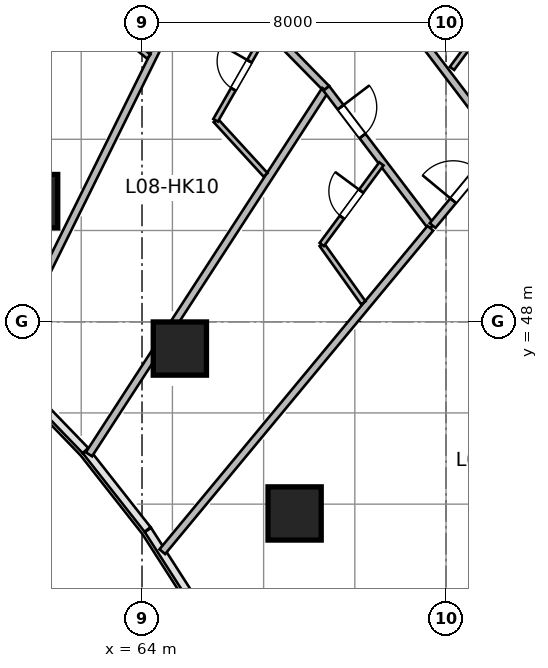
"""IFC4 building model, lengths in metres.
Left out: names, types, materials, properties, quantities, classifications, styles, units other than length and angle.
Written with IfcOpenShell. Run it as: python <this file> out.ifc"""

import sys

from ifc_helpers import new_model, si_unit, direction, frame, frame_2d, origin, origin_2d, place, context, subcontext, project, spatial, rectangle, circle, extrude, source, transform, mapped, element, fill, save


model = new_model("IFC4")
c1 = context("Model", 3, precision=1e-05, world=origin(), true_north=direction((0.0, 1.0)))
c2 = subcontext(c1, "Body", "Model", "MODEL_VIEW")
j1 = project(units=[si_unit("LENGTHUNIT", "METRE"), si_unit("PLANEANGLEUNIT", "RADIAN")], contexts=[c1])
p1 = place(None, origin())
s1 = spatial("IfcSite", under=j1, at=p1, CompositionType="ELEMENT")
p2 = place(p1, origin())
s2 = spatial("IfcBuilding", under=s1, at=p2, CompositionType="ELEMENT")
p3 = place(p2, frame((0.0, 0.0, 42.6)))
s3 = spatial("IfcBuildingStorey", under=s2, at=p3, CompositionType="ELEMENT", Elevation=42.6)
m1 = source(origin(), c2, "Body", "SweptSolid", [
    extrude(circle(Radius=0.7, at=origin_2d()), origin(), (0.0, 0.0, 1.0), 3.6),
])
for number, where, z_axis, x_axis in (
    (1, (61.082, 51.175, 0.0), (0.0, 0.0, 1.0), (0.409, 0.912, 0.0)),
    (2, (64.996, 47.294, 0.0), (0.0, 0.0, 1.0), (0.558, 0.83, 0.0)),
    (3, (68.015, 42.955, 0.0), (0.0, 0.0, 1.0), (0.691, 0.723, 0.0)),
):
    element("IfcColumn", number, at=place(p3, frame(where, z_axis=z_axis, x_axis=x_axis)), inside=s3, PredefinedType="COLUMN", context=c2, shape_type="MappedRepresentation", body=[
        mapped(m1, transform((0.0, 0.0, 0.0), scale=1.0)),
    ])
m2 = source(origin(), c2, "Body", "SweptSolid", [
    extrude(rectangle(XDim=12.196, YDim=0.195, at=frame_2d((6.098, 0.0))), origin(), (0.0, 0.0, 1.0), 3.36),
])
p4 = place(p3, frame((57.742, 48.766, 0.0), z_axis=(0.0, 0.0, 1.0), x_axis=(0.342022711534, 0.939691686031, 0.0)))
e4 = element("IfcWall", 4, at=p4, inside=s3, PredefinedType="PARTITIONING", context=c2, shape_type="MappedRepresentation", body=[
    mapped(m2, transform((0.0, 0.0, 0.0), scale=1.0)),
])
m3 = source(origin(), c2, "Body", "SweptSolid", [
    extrude(rectangle(XDim=11.844, YDim=0.195, at=frame_2d((5.922, 0.0))), origin(), (0.0, 0.0, 1.0), 3.36),
])
p5 = place(p3, frame((60.273, 46.848, 0.0), z_axis=(0.0, 0.0, 1.0), x_axis=(0.442871152218, 0.896585267854, 0.0)))
e5 = element("IfcWall", 5, at=p5, inside=s3, PredefinedType="PARTITIONING", context=c2, shape_type="MappedRepresentation", body=[
    mapped(m3, transform((0.0, 0.0, 0.0), scale=1.0)),
])
m4 = source(origin(), c2, "Body", "SweptSolid", [
    extrude(rectangle(XDim=1.873, YDim=0.14, at=frame_2d((0.937, 0.0))), origin(), (0.0, 0.0, 1.0), 3.36),
])
p6 = place(p3, frame((62.734, 56.169, 0.0), z_axis=(0.0, 0.0, 1.0), x_axis=(0.77069451688, -0.637204803537, 0.0)))
e6 = element("IfcWall", 6, at=p6, inside=s3, PredefinedType="PARTITIONING", context=c2, shape_type="MappedRepresentation", body=[
    mapped(m4, transform((0.0, 0.0, 0.0), scale=1.0)),
])
m5 = source(origin(), c2, "Body", "SweptSolid", [
    extrude(rectangle(XDim=4.724, YDim=0.195, at=frame_2d((2.362, 0.0))), origin(), (0.0, 0.0, 1.0), 3.36),
])
p7 = place(p3, frame((65.541, 57.511, 0.0), z_axis=(0.0, 0.0, 1.0), x_axis=(0.700435057457, -0.713716141253, 0.0)))
e7 = element("IfcWall", 7, at=p7, inside=s3, PredefinedType="PARTITIONING", context=c2, shape_type="MappedRepresentation", body=[
    mapped(m5, transform((0.0, 0.0, 0.0), scale=1.0)),
])
p8 = place(p7, frame((0.659, 0.0, 0.0)))
e8 = element("IfcOpeningElement", 8, at=p8, cuts=e7, PredefinedType="OPENING", context=c2, shape_type="SweptSolid", body=[
    extrude(rectangle(XDim=0.95, YDim=2.15, at=frame_2d((0.475, 1.075))), frame((0.0, 0.107, 0.0), z_axis=(0.0, -1.0, 0.0), x_axis=(1.0, 0.0, 0.0)), (0.0, 0.0, 1.0), 0.215),
])
m6 = source(origin(), c2, "Body", "SweptSolid", [
    extrude(rectangle(XDim=11.429, YDim=0.195, at=frame_2d((5.714, 0.0))), origin(), (0.0, 0.0, 1.0), 3.36),
])
p9 = place(p3, frame((62.604, 44.511, 0.0), z_axis=(0.0, 0.0, 1.0), x_axis=(0.544215487077, 0.838945471187, 0.0)))
e9 = element("IfcWall", 9, at=p9, inside=s3, PredefinedType="PARTITIONING", context=c2, shape_type="MappedRepresentation", body=[
    mapped(m6, transform((0.0, 0.0, 0.0), scale=1.0)),
])
m7 = source(origin(), c2, "Body", "SweptSolid", [
    extrude(rectangle(XDim=1.947, YDim=0.14, at=frame_2d((0.973, 0.0))), origin(), (0.0, 0.0, 1.0), 2.803),
])
p10 = place(p3, frame((65.936, 53.3, 0.0), z_axis=(0.0, 0.0, 1.0), x_axis=(0.675383794012, -0.737466426888, 0.0)))
e10 = element("IfcWall", 10, at=p10, inside=s3, PredefinedType="PARTITIONING", context=c2, shape_type="MappedRepresentation", body=[
    mapped(m7, transform((0.0, 0.0, 0.0), scale=1.0)),
])
m8 = source(origin(), c2, "Body", "SweptSolid", [
    extrude(rectangle(XDim=2.731, YDim=0.14, at=frame_2d((1.366, 0.0))), origin(), (0.0, 0.0, 1.0), 3.36),
])
p11 = place(p3, frame((65.936, 53.3, 0.0), z_axis=(0.0, 0.0, 1.0), x_axis=(0.497120404056, 0.867681568244, 0.0)))
e11 = element("IfcWall", 11, at=p11, inside=s3, PredefinedType="PARTITIONING", context=c2, shape_type="MappedRepresentation", body=[
    mapped(m8, transform((0.0, 0.0, 0.0), scale=1.0)),
])
p12 = place(p11, frame((0.941, 0.0, 0.0)))
e12 = element("IfcOpeningElement", 12, at=p12, cuts=e11, PredefinedType="OPENING", context=c2, shape_type="SweptSolid", body=[
    extrude(rectangle(XDim=0.85, YDim=2.05, at=frame_2d((0.425, 1.025))), frame((0.0, 0.08, 0.0), z_axis=(0.0, -1.0, 0.0), x_axis=(1.0, 0.0, 0.0)), (0.0, 0.0, 1.0), 0.16),
])
m9 = source(origin(), c2, "Body", "SweptSolid", [
    extrude(rectangle(XDim=4.928, YDim=0.195, at=frame_2d((2.464, 0.0))), origin(), (0.0, 0.0, 1.0), 3.36),
])
p13 = place(p3, frame((70.45, 56.607, 0.0), z_axis=(0.0, 0.0, 1.0), x_axis=(0.604793043708, -0.796382680803, 0.0)))
e13 = element("IfcWall", 13, at=p13, inside=s3, PredefinedType="PARTITIONING", context=c2, shape_type="MappedRepresentation", body=[
    mapped(m9, transform((0.0, 0.0, 0.0), scale=1.0)),
])
p14 = place(p13, frame((0.708, 0.0, 0.0)))
e14 = element("IfcOpeningElement", 14, at=p14, cuts=e13, PredefinedType="OPENING", context=c2, shape_type="SweptSolid", body=[
    extrude(rectangle(XDim=0.95, YDim=2.15, at=frame_2d((0.475, 1.075))), frame((0.0, 0.107, 0.0), z_axis=(0.0, -1.0, 0.0), x_axis=(1.0, 0.0, 0.0)), (0.0, 0.0, 1.0), 0.215),
])
m10 = source(origin(), c2, "Body", "SweptSolid", [
    extrude(rectangle(XDim=2.64, YDim=0.14, at=frame_2d((1.32, 0.0))), origin(), (0.0, 0.0, 1.0), 3.36),
])
p15 = place(p3, frame((72.157, 54.666, 0.0), z_axis=(0.0, 0.0, 1.0), x_axis=(0.594630255283, 0.803999290735, 0.0)))
e15 = element("IfcWall", 15, at=p15, inside=s3, PredefinedType="PARTITIONING", context=c2, shape_type="MappedRepresentation", body=[
    mapped(m10, transform((0.0, 0.0, 0.0), scale=1.0)),
])
p16 = place(p15, frame((0.895, 0.0, 0.0)))
e16 = element("IfcOpeningElement", 16, at=p16, cuts=e15, PredefinedType="OPENING", context=c2, shape_type="SweptSolid", body=[
    extrude(rectangle(XDim=0.85, YDim=2.05, at=frame_2d((0.425, 1.025))), frame((0.0, 0.08, 0.0), z_axis=(0.0, -1.0, 0.0), x_axis=(1.0, 0.0, 0.0)), (0.0, 0.0, 1.0), 0.16),
])
m11 = source(origin(), c2, "Body", "SweptSolid", [
    extrude(rectangle(XDim=4.576, YDim=0.195, at=frame_2d((2.288, 0.0))), origin(), (0.0, 0.0, 1.0), 3.36),
])
p17 = place(p3, frame((68.85, 54.139, 0.0), z_axis=(0.0, 0.0, 1.0), x_axis=(0.604795096156, -0.796381122118, 0.0)))
e17 = element("IfcWall", 17, at=p17, inside=s3, PredefinedType="PARTITIONING", context=c2, shape_type="MappedRepresentation", body=[
    mapped(m11, transform((0.0, 0.0, 0.0), scale=1.0)),
])
p18 = place(p17, frame((0.623, 0.0, 0.0)))
e18 = element("IfcOpeningElement", 18, at=p18, cuts=e17, PredefinedType="OPENING", context=c2, shape_type="SweptSolid", body=[
    extrude(rectangle(XDim=0.95, YDim=2.15, at=frame_2d((0.475, 1.075))), frame((0.0, 0.107, 0.0), z_axis=(0.0, -1.0, 0.0), x_axis=(1.0, 0.0, 0.0)), (0.0, 0.0, 1.0), 0.215),
])
m12 = source(origin(), c2, "Body", "SweptSolid", [
    extrude(rectangle(XDim=11.053, YDim=0.195, at=frame_2d((5.527, 0.0))), origin(), (0.0, 0.0, 1.0), 3.36),
])
p19 = place(p3, frame((64.534, 41.949, 0.0), z_axis=(0.0, 0.0, 1.0), x_axis=(0.638131235571, 0.769927611005, 0.0)))
e19 = element("IfcWall", 19, at=p19, inside=s3, PredefinedType="PARTITIONING", context=c2, shape_type="MappedRepresentation", body=[
    mapped(m12, transform((0.0, 0.0, 0.0), scale=1.0)),
])
m13 = source(origin(), c2, "Body", "SweptSolid", [
    extrude(rectangle(XDim=1.884, YDim=0.14, at=frame_2d((0.942, 0.0))), origin(), (0.0, 0.0, 1.0), 2.803),
])
p20 = place(p3, frame((68.729, 50.031, 0.0), z_axis=(0.0, 0.0, 1.0), x_axis=(0.580833492897, -0.814022391295, 0.0)))
e20 = element("IfcWall", 20, at=p20, inside=s3, PredefinedType="PARTITIONING", context=c2, shape_type="MappedRepresentation", body=[
    mapped(m13, transform((0.0, 0.0, 0.0), scale=1.0)),
])
p21 = place(p3, frame((68.729, 50.031, 0.0), z_axis=(0.0, 0.0, 1.0), x_axis=(0.594674469522, 0.803966588422, 0.0)))
e21 = element("IfcWall", 21, at=p21, inside=s3, PredefinedType="PARTITIONING", context=c2, shape_type="MappedRepresentation", body=[
    mapped(m10, transform((0.0, 0.0, 0.0), scale=1.0)),
])
p22 = place(p21, frame((0.895, 0.0, 0.0)))
e22 = element("IfcOpeningElement", 22, at=p22, cuts=e21, PredefinedType="OPENING", context=c2, shape_type="SweptSolid", body=[
    extrude(rectangle(XDim=0.85, YDim=2.05, at=frame_2d((0.425, 1.025))), frame((0.0, 0.08, 0.0), z_axis=(0.0, -1.0, 0.0), x_axis=(1.0, 0.0, 0.0)), (0.0, 0.0, 1.0), 0.16),
])
m14 = source(origin(), c2, "Body", "SweptSolid", [
    extrude(rectangle(XDim=2.748, YDim=0.195, at=frame_2d((1.374, 0.0))), origin(), (0.0, 0.0, 1.0), 3.36),
])
p23 = place(p3, frame((71.647, 50.531, 0.0), z_axis=(0.0, 0.0, 1.0), x_axis=(0.638111168284, 0.769944242729, 0.0)))
e23 = element("IfcWall", 23, at=p23, inside=s3, PredefinedType="PARTITIONING", context=c2, shape_type="MappedRepresentation", body=[
    mapped(m14, transform((0.0, 0.0, 0.0), scale=1.0)),
])
p24 = place(p23, frame((0.849, 0.0, 0.0)))
e24 = element("IfcOpeningElement", 24, at=p24, cuts=e23, PredefinedType="OPENING", context=c2, shape_type="SweptSolid", body=[
    extrude(rectangle(XDim=1.05, YDim=2.15, at=frame_2d((0.525, 1.075))), frame((0.0, 0.107, 0.0), z_axis=(0.0, -1.0, 0.0), x_axis=(1.0, 0.0, 0.0)), (0.0, 0.0, 1.0), 0.215),
])
m15 = source(origin(), c2, "Body", "SweptSolid", [
    extrude(rectangle(XDim=0.85, YDim=2.05, at=frame_2d((0.425, 1.025))), frame((0.0, 0.025, 0.0), z_axis=(0.0, -1.0, 0.0), x_axis=(1.0, 0.0, 0.0)), (0.0, 0.0, 1.0), 0.05),
])
p25 = place(p12, origin())
e25 = element("IfcDoor", 25, at=p25, inside=s3, OperationType="SINGLE_SWING_RIGHT", PredefinedType="DOOR", context=c2, shape_type="MappedRepresentation", body=[
    mapped(m15, transform((0.0, 0.0, 0.0), scale=1.0)),
])
fill(e12, e25)
m16 = source(origin(), c2, "Body", "SweptSolid", [
    extrude(rectangle(XDim=0.95, YDim=2.15, at=frame_2d((0.475, 1.075))), frame((0.0, 0.025, 0.0), z_axis=(0.0, -1.0, 0.0), x_axis=(1.0, 0.0, 0.0)), (0.0, 0.0, 1.0), 0.05),
])
p26 = place(p18, origin())
e26 = element("IfcDoor", 26, at=p26, inside=s3, OperationType="SINGLE_SWING_LEFT", PredefinedType="DOOR", context=c2, shape_type="MappedRepresentation", body=[
    mapped(m16, transform((0.0, 0.0, 0.0), scale=1.0)),
])
fill(e18, e26)
p27 = place(p22, origin())
e27 = element("IfcDoor", 27, at=p27, inside=s3, OperationType="SINGLE_SWING_RIGHT", PredefinedType="DOOR", context=c2, shape_type="MappedRepresentation", body=[
    mapped(m15, transform((0.0, 0.0, 0.0), scale=1.0)),
])
fill(e22, e27)
m17 = source(origin(), c2, "Body", "SweptSolid", [
    extrude(rectangle(XDim=1.05, YDim=2.15, at=frame_2d((0.525, 1.075))), frame((0.0, 0.025, 0.0), z_axis=(0.0, -1.0, 0.0), x_axis=(1.0, 0.0, 0.0)), (0.0, 0.0, 1.0), 0.05),
])
p28 = place(p24, origin())
e28 = element("IfcDoor", 28, at=p28, inside=s3, OperationType="SINGLE_SWING_LEFT", PredefinedType="DOOR", context=c2, shape_type="MappedRepresentation", body=[
    mapped(m17, transform((0.0, 0.0, 0.0), scale=1.0)),
])
fill(e24, e28)
save(model, sys.argv[1])
